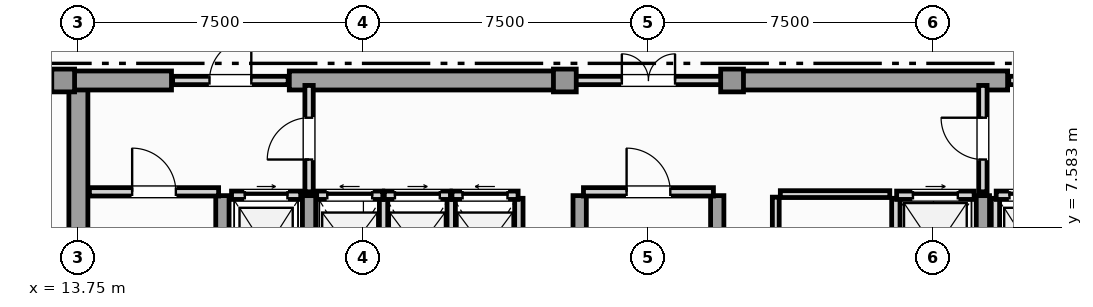
"""IFC4 building model, lengths in metres.
Left out: names, types, materials, properties, quantities, classifications, styles, units other than length and angle.
Written with IfcOpenShell. Run it as: python <this file> out.ifc"""

import sys

from ifc_helpers import new_model, si_unit, direction, frame, frame_2d, origin, origin_2d, place, context, subcontext, project, spatial, rectangle, extrude, element, fill, save


model = new_model("IFC4")
c1 = context("Model", 3, precision=1e-05, world=origin(), true_north=direction((0.0, 1.0)))
c2 = subcontext(c1, "Body", "Model", "MODEL_VIEW")
j1 = project(units=[si_unit("LENGTHUNIT", "METRE"), si_unit("PLANEANGLEUNIT", "RADIAN")], contexts=[c1])
p1 = place(None, origin())
s1 = spatial("IfcSite", under=j1, at=p1, CompositionType="ELEMENT")
p2 = place(p1, origin())
s2 = spatial("IfcBuilding", under=s1, at=p2, CompositionType="ELEMENT")
p3 = place(p2, frame((0.0, 0.0, 349.05)))
s3 = spatial("IfcBuildingStorey", under=s2, at=p3, CompositionType="ELEMENT", Elevation=349.05)
p4 = place(p3, frame((13.75, 0.92, 0.0), z_axis=(0.0, 0.0, 1.0), x_axis=(0.0, 1.0, 0.0)))
e1 = element("IfcWall", 1, at=p4, inside=s3, PredefinedType="SHEAR", context=c2, shape_type="SweptSolid", body=[
    extrude(rectangle(XDim=10.53, YDim=0.5, at=frame_2d((5.265, 0.0))), origin(), (0.0, 0.0, 1.0), 4.14),
])
p5 = place(p3, frame((13.25, 11.45, 0.0), z_axis=(0.0, 0.0, 1.0), x_axis=(1.0, 0.0, 0.0)))
e2 = element("IfcWall", 2, at=p5, inside=s3, PredefinedType="SHEAR", context=c2, shape_type="SweptSolid", body=[
    extrude(rectangle(XDim=2.95, YDim=0.5, at=frame_2d((1.475, 0.0))), origin(), (0.0, 0.0, 1.0), 4.14),
])
for number, where, z_axis, x_axis in (
    (3, (19.3, 11.45, 0.0), (0.0, 0.0, 1.0), (1.0, 0.0, 0.0)),
    (4, (30.9, 11.45, 0.0), (0.0, 0.0, 1.0), (1.0, 0.0, 0.0)),
):
    element("IfcWall", number, at=place(p3, frame(where, z_axis=z_axis, x_axis=x_axis)), inside=s3, PredefinedType="SHEAR", context=c2, shape_type="SweptSolid", body=[
        extrude(rectangle(XDim=7.3, YDim=0.5, at=frame_2d((3.65, 0.0))), origin(), (0.0, 0.0, 1.0), 4.14),
    ])
for number, where, z_axis, x_axis in (
    (5, (17.54, 0.92, 0.0), (0.0, 0.0, 1.0), (0.0, 1.0, 0.0)),
    (6, (19.82, 0.92, 0.0), (0.0, 0.0, 1.0), (0.0, 1.0, 0.0)),
    (7, (26.94, 0.92, 0.0), (0.0, 0.0, 1.0), (0.0, 1.0, 0.0)),
    (8, (30.56, 0.92, 0.0), (0.0, 0.0, 1.0), (0.0, 1.0, 0.0)),
    (9, (37.55, 0.92, 0.0), (0.0, 0.0, 1.0), (0.0, 1.0, 0.0)),
):
    element("IfcWall", number, at=place(p3, frame(where, z_axis=z_axis, x_axis=x_axis)), inside=s3, PredefinedType="SHEAR", context=c2, shape_type="SweptSolid", body=[
        extrude(rectangle(XDim=7.5, YDim=0.35, at=frame_2d((3.75, 0.0))), origin(), (0.0, 0.0, 1.0), 4.14),
    ])
for number, where, z_axis, x_axis in (
    (10, (13.35, 11.45, 0.0), (0.0, 0.0, 1.0), (1.0, 0.0, 0.0)),
    (11, (26.55, 11.45, 0.0), (0.0, 0.0, 1.0), (1.0, 0.0, 0.0)),
    (12, (30.95, 11.45, 0.0), (0.0, 0.0, 1.0), (1.0, 0.0, 0.0)),
):
    element("IfcColumn", number, at=place(p3, frame(where, z_axis=z_axis, x_axis=x_axis)), inside=s3, PredefinedType="COLUMN", context=c2, shape_type="SweptSolid", body=[
        extrude(rectangle(XDim=0.6, YDim=0.6, at=origin_2d()), origin(), (0.0, 0.0, 1.0), 4.4),
    ])
p6 = place(p3, frame((17.78, 8.43, 0.0), z_axis=(0.0, 0.0, 1.0), x_axis=(1.0, 0.0, 0.0)))
e13 = element("IfcWall", 13, at=p6, inside=s3, PredefinedType="SOLIDWALL", context=c2, shape_type="SweptSolid", body=[
    extrude(rectangle(XDim=1.82, YDim=0.22, at=frame_2d((0.91, 0.0))), origin(), (0.0, 0.0, 1.0), 4.14),
])
p7 = place(p6, frame((0.35, 0.0, 0.0)))
e14 = element("IfcOpeningElement", 14, at=p7, cuts=e13, PredefinedType="OPENING", context=c2, shape_type="SweptSolid", body=[
    extrude(rectangle(XDim=1.12, YDim=2.25, at=frame_2d((0.56, 1.125))), frame((0.0, 0.12, 0.0), z_axis=(0.0, -1.0, 0.0), x_axis=(1.0, 0.0, 0.0)), (0.0, 0.0, 1.0), 0.24),
])
p8 = place(p3, frame((37.88, 5.65, 0.0), z_axis=(0.0, 0.0, 1.0), x_axis=(0.0, 1.0, 0.0)))
e15 = element("IfcWall", 15, at=p8, inside=s3, PredefinedType="SOLIDWALL", context=c2, shape_type="SweptSolid", body=[
    extrude(rectangle(XDim=2.7, YDim=0.22, at=frame_2d((1.35, 0.0))), origin(), (0.0, 0.0, 1.0), 4.14),
])
p9 = place(p3, frame((37.9, 8.43, 0.0), z_axis=(0.0, 0.0, 1.0), x_axis=(1.0, 0.0, 0.0)))
e16 = element("IfcWall", 16, at=p9, inside=s3, PredefinedType="SOLIDWALL", context=c2, shape_type="SweptSolid", body=[
    extrude(rectangle(XDim=1.82, YDim=0.22, at=frame_2d((0.91, 0.0))), origin(), (0.0, 0.0, 1.0), 4.14),
])
p10 = place(p9, frame((0.35, 0.0, 0.0)))
e17 = element("IfcOpeningElement", 17, at=p10, cuts=e16, PredefinedType="OPENING", context=c2, shape_type="SweptSolid", body=[
    extrude(rectangle(XDim=1.12, YDim=2.25, at=frame_2d((0.56, 1.125))), frame((0.0, 0.12, 0.0), z_axis=(0.0, -1.0, 0.0), x_axis=(1.0, 0.0, 0.0)), (0.0, 0.0, 1.0), 0.24),
])
p11 = place(p3, frame((35.26, 5.65, 0.0), z_axis=(0.0, 0.0, 1.0), x_axis=(0.0, 1.0, 0.0)))
e18 = element("IfcWall", 18, at=p11, inside=s3, PredefinedType="SOLIDWALL", context=c2, shape_type="SweptSolid", body=[
    extrude(rectangle(XDim=2.7, YDim=0.22, at=frame_2d((1.35, 0.0))), origin(), (0.0, 0.0, 1.0), 4.14),
])
p12 = place(p3, frame((35.28, 8.43, 0.0), z_axis=(0.0, 0.0, 1.0), x_axis=(1.0, 0.0, 0.0)))
e19 = element("IfcWall", 19, at=p12, inside=s3, PredefinedType="SOLIDWALL", context=c2, shape_type="SweptSolid", body=[
    extrude(rectangle(XDim=2.04, YDim=0.22, at=frame_2d((1.02, 0.0))), origin(), (0.0, 0.0, 1.0), 4.14),
])
p13 = place(p12, frame((0.43, 0.0, 0.0)))
e20 = element("IfcOpeningElement", 20, at=p13, cuts=e19, PredefinedType="OPENING", context=c2, shape_type="SweptSolid", body=[
    extrude(rectangle(XDim=1.18, YDim=2.2, at=frame_2d((0.59, 1.1))), frame((0.0, 0.12, 0.0), z_axis=(0.0, -1.0, 0.0), x_axis=(1.0, 0.0, 0.0)), (0.0, 0.0, 1.0), 0.24),
])
p14 = place(p3, frame((21.78, 5.65, 0.0), z_axis=(0.0, 0.0, 1.0), x_axis=(0.0, 1.0, 0.0)))
e21 = element("IfcWall", 21, at=p14, inside=s3, PredefinedType="SOLIDWALL", context=c2, shape_type="SweptSolid", body=[
    extrude(rectangle(XDim=2.7, YDim=0.22, at=frame_2d((1.35, 0.0))), origin(), (0.0, 0.0, 1.0), 4.14),
])
p15 = place(p3, frame((20.02, 8.43, 0.0), z_axis=(0.0, 0.0, 1.0), x_axis=(1.0, 0.0, 0.0)))
e22 = element("IfcWall", 22, at=p15, inside=s3, PredefinedType="SOLIDWALL", context=c2, shape_type="SweptSolid", body=[
    extrude(rectangle(XDim=1.74, YDim=0.22, at=frame_2d((0.87, 0.0))), origin(), (0.0, 0.0, 1.0), 4.14),
])
p16 = place(p15, frame((0.28, 0.0, 0.0)))
e23 = element("IfcOpeningElement", 23, at=p16, cuts=e22, PredefinedType="OPENING", context=c2, shape_type="SweptSolid", body=[
    extrude(rectangle(XDim=1.18, YDim=2.2, at=frame_2d((0.59, 1.1))), frame((0.0, 0.12, 0.0), z_axis=(0.0, -1.0, 0.0), x_axis=(1.0, 0.0, 0.0)), (0.0, 0.0, 1.0), 0.24),
])
p17 = place(p3, frame((23.56, 5.65, 0.0), z_axis=(0.0, 0.0, 1.0), x_axis=(0.0, 1.0, 0.0)))
e24 = element("IfcWall", 24, at=p17, inside=s3, PredefinedType="SOLIDWALL", context=c2, shape_type="SweptSolid", body=[
    extrude(rectangle(XDim=2.7, YDim=0.22, at=frame_2d((1.35, 0.0))), origin(), (0.0, 0.0, 1.0), 4.14),
])
p18 = place(p3, frame((21.8, 8.43, 0.0), z_axis=(0.0, 0.0, 1.0), x_axis=(1.0, 0.0, 0.0)))
e25 = element("IfcWall", 25, at=p18, inside=s3, PredefinedType="SOLIDWALL", context=c2, shape_type="SweptSolid", body=[
    extrude(rectangle(XDim=1.74, YDim=0.22, at=frame_2d((0.87, 0.0))), origin(), (0.0, 0.0, 1.0), 4.14),
])
p19 = place(p18, frame((0.28, 0.0, 0.0)))
e26 = element("IfcOpeningElement", 26, at=p19, cuts=e25, PredefinedType="OPENING", context=c2, shape_type="SweptSolid", body=[
    extrude(rectangle(XDim=1.18, YDim=2.2, at=frame_2d((0.59, 1.1))), frame((0.0, 0.12, 0.0), z_axis=(0.0, -1.0, 0.0), x_axis=(1.0, 0.0, 0.0)), (0.0, 0.0, 1.0), 0.24),
])
p20 = place(p3, frame((25.34, 5.65, 0.0), z_axis=(0.0, 0.0, 1.0), x_axis=(0.0, 1.0, 0.0)))
e27 = element("IfcWall", 27, at=p20, inside=s3, PredefinedType="SOLIDWALL", context=c2, shape_type="SweptSolid", body=[
    extrude(rectangle(XDim=2.7, YDim=0.22, at=frame_2d((1.35, 0.0))), origin(), (0.0, 0.0, 1.0), 4.14),
])
p21 = place(p3, frame((23.58, 8.43, 0.0), z_axis=(0.0, 0.0, 1.0), x_axis=(1.0, 0.0, 0.0)))
e28 = element("IfcWall", 28, at=p21, inside=s3, PredefinedType="SOLIDWALL", context=c2, shape_type="SweptSolid", body=[
    extrude(rectangle(XDim=1.74, YDim=0.22, at=frame_2d((0.87, 0.0))), origin(), (0.0, 0.0, 1.0), 4.14),
])
p22 = place(p21, frame((0.28, 0.0, 0.0)))
e29 = element("IfcOpeningElement", 29, at=p22, cuts=e28, PredefinedType="OPENING", context=c2, shape_type="SweptSolid", body=[
    extrude(rectangle(XDim=1.18, YDim=2.2, at=frame_2d((0.59, 1.1))), frame((0.0, 0.12, 0.0), z_axis=(0.0, -1.0, 0.0), x_axis=(1.0, 0.0, 0.0)), (0.0, 0.0, 1.0), 0.24),
])
p23 = place(p3, frame((14.04, 8.52, 0.0), z_axis=(0.0, 0.0, 1.0), x_axis=(1.0, 0.0, 0.0)))
e30 = element("IfcWall", 30, at=p23, inside=s3, PredefinedType="SOLIDWALL", context=c2, shape_type="SweptSolid", body=[
    extrude(rectangle(XDim=3.4, YDim=0.22, at=frame_2d((1.7, 0.0))), origin(), (0.0, 0.0, 1.0), 4.14),
])
p24 = place(p23, frame((1.125, 0.0, 0.0)))
e31 = element("IfcOpeningElement", 31, at=p24, cuts=e30, PredefinedType="OPENING", context=c2, shape_type="SweptSolid", body=[
    extrude(rectangle(XDim=1.15, YDim=2.2, at=frame_2d((0.575, 1.1))), frame((0.0, 0.12, 0.0), z_axis=(0.0, -1.0, 0.0), x_axis=(1.0, 0.0, 0.0)), (0.0, 0.0, 1.0), 0.24),
])
p25 = place(p3, frame((27.04, 8.52, 0.0), z_axis=(0.0, 0.0, 1.0), x_axis=(1.0, 0.0, 0.0)))
e32 = element("IfcWall", 32, at=p25, inside=s3, PredefinedType="SOLIDWALL", context=c2, shape_type="SweptSolid", body=[
    extrude(rectangle(XDim=3.42, YDim=0.22, at=frame_2d((1.71, 0.0))), origin(), (0.0, 0.0, 1.0), 4.14),
])
p26 = place(p25, frame((1.135, 0.0, 0.0)))
e33 = element("IfcOpeningElement", 33, at=p26, cuts=e32, PredefinedType="OPENING", context=c2, shape_type="SweptSolid", body=[
    extrude(rectangle(XDim=1.15, YDim=2.2, at=frame_2d((0.575, 1.1))), frame((0.0, 0.12, 0.0), z_axis=(0.0, -1.0, 0.0), x_axis=(1.0, 0.0, 0.0)), (0.0, 0.0, 1.0), 0.24),
])
p27 = place(p3, frame((19.82, 8.52, 0.0), z_axis=(0.0, 0.0, 1.0), x_axis=(0.0, 1.0, 0.0)))
e34 = element("IfcWall", 34, at=p27, inside=s3, PredefinedType="SOLIDWALL", context=c2, shape_type="SweptSolid", body=[
    extrude(rectangle(XDim=2.8, YDim=0.22, at=frame_2d((1.4, 0.0))), origin(), (0.0, 0.0, 1.0), 3.595),
])
p28 = place(p27, frame((0.85, 0.0, 0.0)))
e35 = element("IfcOpeningElement", 35, at=p28, cuts=e34, PredefinedType="OPENING", context=c2, shape_type="SweptSolid", body=[
    extrude(rectangle(XDim=1.1, YDim=2.2, at=frame_2d((0.55, 1.1))), frame((0.0, 0.12, 0.0), z_axis=(0.0, -1.0, 0.0), x_axis=(1.0, 0.0, 0.0)), (0.0, 0.0, 1.0), 0.24),
])
p29 = place(p3, frame((37.55, 8.52, 0.0), z_axis=(0.0, 0.0, 1.0), x_axis=(0.0, 1.0, 0.0)))
e36 = element("IfcWall", 36, at=p29, inside=s3, PredefinedType="SOLIDWALL", context=c2, shape_type="SweptSolid", body=[
    extrude(rectangle(XDim=2.8, YDim=0.22, at=frame_2d((1.4, 0.0))), origin(), (0.0, 0.0, 1.0), 3.595),
])
p30 = place(p29, frame((0.85, 0.0, 0.0)))
e37 = element("IfcOpeningElement", 37, at=p30, cuts=e36, PredefinedType="OPENING", context=c2, shape_type="SweptSolid", body=[
    extrude(rectangle(XDim=1.1, YDim=2.2, at=frame_2d((0.55, 1.1))), frame((0.0, 0.12, 0.0), z_axis=(0.0, -1.0, 0.0), x_axis=(1.0, 0.0, 0.0)), (0.0, 0.0, 1.0), 0.24),
])
p31 = place(p3, frame((16.23, 11.45, 0.0), z_axis=(0.0, 0.0, 1.0), x_axis=(1.0, 0.0, 0.0)))
e38 = element("IfcWall", 38, at=p31, inside=s3, PredefinedType="SOLIDWALL", context=c2, shape_type="SweptSolid", body=[
    extrude(rectangle(XDim=3.04, YDim=0.22, at=frame_2d((1.52, 0.0))), origin(), (0.0, 0.0, 1.0), 4.14),
])
p32 = place(p31, frame((0.97, 0.0, 0.0)))
e39 = element("IfcOpeningElement", 39, at=p32, cuts=e38, PredefinedType="OPENING", context=c2, shape_type="SweptSolid", body=[
    extrude(rectangle(XDim=1.1, YDim=2.2, at=frame_2d((0.55, 1.1))), frame((0.0, 0.12, 0.0), z_axis=(0.0, -1.0, 0.0), x_axis=(1.0, 0.0, 0.0)), (0.0, 0.0, 1.0), 0.24),
])
p33 = place(p3, frame((26.63, 11.45, 0.0), z_axis=(0.0, 0.0, 1.0), x_axis=(1.0, 0.0, 0.0)))
e40 = element("IfcWall", 40, at=p33, inside=s3, PredefinedType="SOLIDWALL", context=c2, shape_type="SweptSolid", body=[
    extrude(rectangle(XDim=4.24, YDim=0.22, at=frame_2d((2.12, 0.0))), origin(), (0.0, 0.0, 1.0), 4.14),
])
p34 = place(p33, frame((1.42, 0.0, 0.0)))
e41 = element("IfcOpeningElement", 41, at=p34, cuts=e40, PredefinedType="OPENING", context=c2, shape_type="SweptSolid", body=[
    extrude(rectangle(XDim=1.4, YDim=2.2, at=frame_2d((0.7, 1.1))), frame((0.0, 0.12, 0.0), z_axis=(0.0, -1.0, 0.0), x_axis=(1.0, 0.0, 0.0)), (0.0, 0.0, 1.0), 0.24),
])
p35 = place(p3, frame((38.23, 11.45, 0.0), z_axis=(0.0, 0.0, 1.0), x_axis=(1.0, 0.0, 0.0)))
e42 = element("IfcWall", 42, at=p35, inside=s3, PredefinedType="SOLIDWALL", context=c2, shape_type="SweptSolid", body=[
    extrude(rectangle(XDim=3.04, YDim=0.22, at=frame_2d((1.52, 0.0))), origin(), (0.0, 0.0, 1.0), 4.14),
])
p36 = place(p35, frame((0.97, 0.0, 0.0)))
e43 = element("IfcOpeningElement", 43, at=p36, cuts=e42, PredefinedType="OPENING", context=c2, shape_type="SweptSolid", body=[
    extrude(rectangle(XDim=1.1, YDim=2.2, at=frame_2d((0.55, 1.1))), frame((0.0, 0.12, 0.0), z_axis=(0.0, -1.0, 0.0), x_axis=(1.0, 0.0, 0.0)), (0.0, 0.0, 1.0), 0.24),
])
p37 = place(p3, frame((32.1, 5.65, 0.0), z_axis=(0.0, 0.0, 1.0), x_axis=(0.0, 1.0, 0.0)))
e44 = element("IfcWall", 44, at=p37, inside=s3, PredefinedType="PARTITIONING", context=c2, shape_type="SweptSolid", body=[
    extrude(rectangle(XDim=2.73, YDim=0.18, at=frame_2d((1.365, 0.0))), origin(), (0.0, 0.0, 1.0), 4.14),
])
p38 = place(p37, frame((0.925, 0.0, 0.0)))
e45 = element("IfcOpeningElement", 45, at=p38, cuts=e44, PredefinedType="OPENING", context=c2, shape_type="SweptSolid", body=[
    extrude(rectangle(XDim=0.88, YDim=2.05, at=frame_2d((0.44, 1.025))), frame((0.0, 0.1, 0.0), z_axis=(0.0, -1.0, 0.0), x_axis=(1.0, 0.0, 0.0)), (0.0, 0.0, 1.0), 0.2),
])
p39 = place(p3, frame((32.22, 8.46, 0.0), z_axis=(0.0, 0.0, 1.0), x_axis=(1.0, 0.0, 0.0)))
e46 = element("IfcWall", 46, at=p39, inside=s3, PredefinedType="PARTITIONING", context=c2, shape_type="SweptSolid", body=[
    extrude(rectangle(XDim=2.88, YDim=0.18, at=frame_2d((1.44, 0.0))), origin(), (0.0, 0.0, 1.0), 4.14),
])
p40 = place(p3, frame((9.711, 11.6, 0.0), z_axis=(0.0, 0.0, 1.0), x_axis=(1.0, 0.0, 0.0)))
e47 = element("IfcWall", 47, at=p40, inside=s3, PredefinedType="PARTITIONING", context=c2, shape_type="SweptSolid", body=[
    extrude(rectangle(XDim=3.434, YDim=0.18, at=frame_2d((1.717, 0.0))), origin(), (0.0, 0.0, 1.0), 4.14),
])
p41 = place(p40, frame((1.217, 0.0, 0.0)))
e48 = element("IfcOpeningElement", 48, at=p41, cuts=e47, PredefinedType="OPENING", context=c2, shape_type="SweptSolid", body=[
    extrude(rectangle(XDim=1.0, YDim=2.15, at=frame_2d((0.5, 1.075))), frame((0.0, 0.1, 0.0), z_axis=(0.0, -1.0, 0.0), x_axis=(1.0, 0.0, 0.0)), (0.0, 0.0, 1.0), 0.2),
])
p42 = place(p7, origin())
e49 = element("IfcDoor", 49, at=p42, inside=s3, OperationType="SLIDING_TO_RIGHT", PredefinedType="DOOR", context=c2, shape_type="SweptSolid", body=[
    extrude(rectangle(XDim=1.12, YDim=2.25, at=frame_2d((0.56, 1.125))), frame((0.0, 0.025, 0.0), z_axis=(0.0, -1.0, 0.0), x_axis=(1.0, 0.0, 0.0)), (0.0, 0.0, 1.0), 0.05),
])
fill(e14, e49)
p43 = place(p10, origin())
e50 = element("IfcDoor", 50, at=p43, inside=s3, OperationType="SLIDING_TO_LEFT", PredefinedType="DOOR", context=c2, shape_type="SweptSolid", body=[
    extrude(rectangle(XDim=1.12, YDim=2.25, at=frame_2d((0.56, 1.125))), frame((0.0, 0.025, 0.0), z_axis=(0.0, -1.0, 0.0), x_axis=(1.0, 0.0, 0.0)), (0.0, 0.0, 1.0), 0.05),
])
fill(e17, e50)
p44 = place(p13, origin())
e51 = element("IfcDoor", 51, at=p44, inside=s3, OperationType="SLIDING_TO_RIGHT", PredefinedType="DOOR", context=c2, shape_type="SweptSolid", body=[
    extrude(rectangle(XDim=1.18, YDim=2.2, at=frame_2d((0.59, 1.1))), frame((0.0, 0.025, 0.0), z_axis=(0.0, -1.0, 0.0), x_axis=(1.0, 0.0, 0.0)), (0.0, 0.0, 1.0), 0.05),
])
fill(e20, e51)
p45 = place(p16, origin())
e52 = element("IfcDoor", 52, at=p45, inside=s3, OperationType="SLIDING_TO_LEFT", PredefinedType="DOOR", context=c2, shape_type="SweptSolid", body=[
    extrude(rectangle(XDim=1.18, YDim=2.2, at=frame_2d((0.59, 1.1))), frame((0.0, 0.025, 0.0), z_axis=(0.0, -1.0, 0.0), x_axis=(1.0, 0.0, 0.0)), (0.0, 0.0, 1.0), 0.05),
])
fill(e23, e52)
p46 = place(p19, origin())
e53 = element("IfcDoor", 53, at=p46, inside=s3, OperationType="SLIDING_TO_RIGHT", PredefinedType="DOOR", context=c2, shape_type="SweptSolid", body=[
    extrude(rectangle(XDim=1.18, YDim=2.2, at=frame_2d((0.59, 1.1))), frame((0.0, 0.025, 0.0), z_axis=(0.0, -1.0, 0.0), x_axis=(1.0, 0.0, 0.0)), (0.0, 0.0, 1.0), 0.05),
])
fill(e26, e53)
p47 = place(p22, origin())
e54 = element("IfcDoor", 54, at=p47, inside=s3, OperationType="SLIDING_TO_LEFT", PredefinedType="DOOR", context=c2, shape_type="SweptSolid", body=[
    extrude(rectangle(XDim=1.18, YDim=2.2, at=frame_2d((0.59, 1.1))), frame((0.0, 0.025, 0.0), z_axis=(0.0, -1.0, 0.0), x_axis=(1.0, 0.0, 0.0)), (0.0, 0.0, 1.0), 0.05),
])
fill(e29, e54)
p48 = place(p24, origin())
e55 = element("IfcDoor", 55, at=p48, inside=s3, OperationType="SINGLE_SWING_LEFT", PredefinedType="DOOR", context=c2, shape_type="SweptSolid", body=[
    extrude(rectangle(XDim=1.15, YDim=2.2, at=frame_2d((0.575, 1.1))), frame((0.0, 0.025, 0.0), z_axis=(0.0, -1.0, 0.0), x_axis=(1.0, 0.0, 0.0)), (0.0, 0.0, 1.0), 0.05),
])
fill(e31, e55)
p49 = place(p26, origin())
e56 = element("IfcDoor", 56, at=p49, inside=s3, OperationType="SINGLE_SWING_LEFT", PredefinedType="DOOR", context=c2, shape_type="SweptSolid", body=[
    extrude(rectangle(XDim=1.15, YDim=2.2, at=frame_2d((0.575, 1.1))), frame((0.0, 0.025, 0.0), z_axis=(0.0, -1.0, 0.0), x_axis=(1.0, 0.0, 0.0)), (0.0, 0.0, 1.0), 0.05),
])
fill(e33, e56)
p50 = place(p28, origin())
e57 = element("IfcDoor", 57, at=p50, inside=s3, OperationType="SINGLE_SWING_LEFT", PredefinedType="DOOR", context=c2, shape_type="SweptSolid", body=[
    extrude(rectangle(XDim=1.1, YDim=2.2, at=frame_2d((0.55, 1.1))), frame((0.0, 0.025, 0.0), z_axis=(0.0, -1.0, 0.0), x_axis=(1.0, 0.0, 0.0)), (0.0, 0.0, 1.0), 0.05),
])
fill(e35, e57)
p51 = place(p30, origin())
e58 = element("IfcDoor", 58, at=p51, inside=s3, OperationType="SINGLE_SWING_RIGHT", PredefinedType="DOOR", context=c2, shape_type="SweptSolid", body=[
    extrude(rectangle(XDim=1.1, YDim=2.2, at=frame_2d((0.55, 1.1))), frame((0.0, 0.025, 0.0), z_axis=(0.0, -1.0, 0.0), x_axis=(1.0, 0.0, 0.0)), (0.0, 0.0, 1.0), 0.05),
])
fill(e37, e58)
p52 = place(p32, origin())
e59 = element("IfcDoor", 59, at=p52, inside=s3, OperationType="SINGLE_SWING_RIGHT", PredefinedType="DOOR", context=c2, shape_type="SweptSolid", body=[
    extrude(rectangle(XDim=1.1, YDim=2.2, at=frame_2d((0.55, 1.1))), frame((0.0, 0.025, 0.0), z_axis=(0.0, -1.0, 0.0), x_axis=(1.0, 0.0, 0.0)), (0.0, 0.0, 1.0), 0.05),
])
fill(e39, e59)
p53 = place(p34, origin())
e60 = element("IfcDoor", 60, at=p53, inside=s3, OperationType="DOUBLE_DOOR_SINGLE_SWING", PredefinedType="DOOR", context=c2, shape_type="SweptSolid", body=[
    extrude(rectangle(XDim=1.4, YDim=2.2, at=frame_2d((0.7, 1.1))), frame((0.0, 0.025, 0.0), z_axis=(0.0, -1.0, 0.0), x_axis=(1.0, 0.0, 0.0)), (0.0, 0.0, 1.0), 0.05),
])
fill(e41, e60)
save(model, sys.argv[1])
